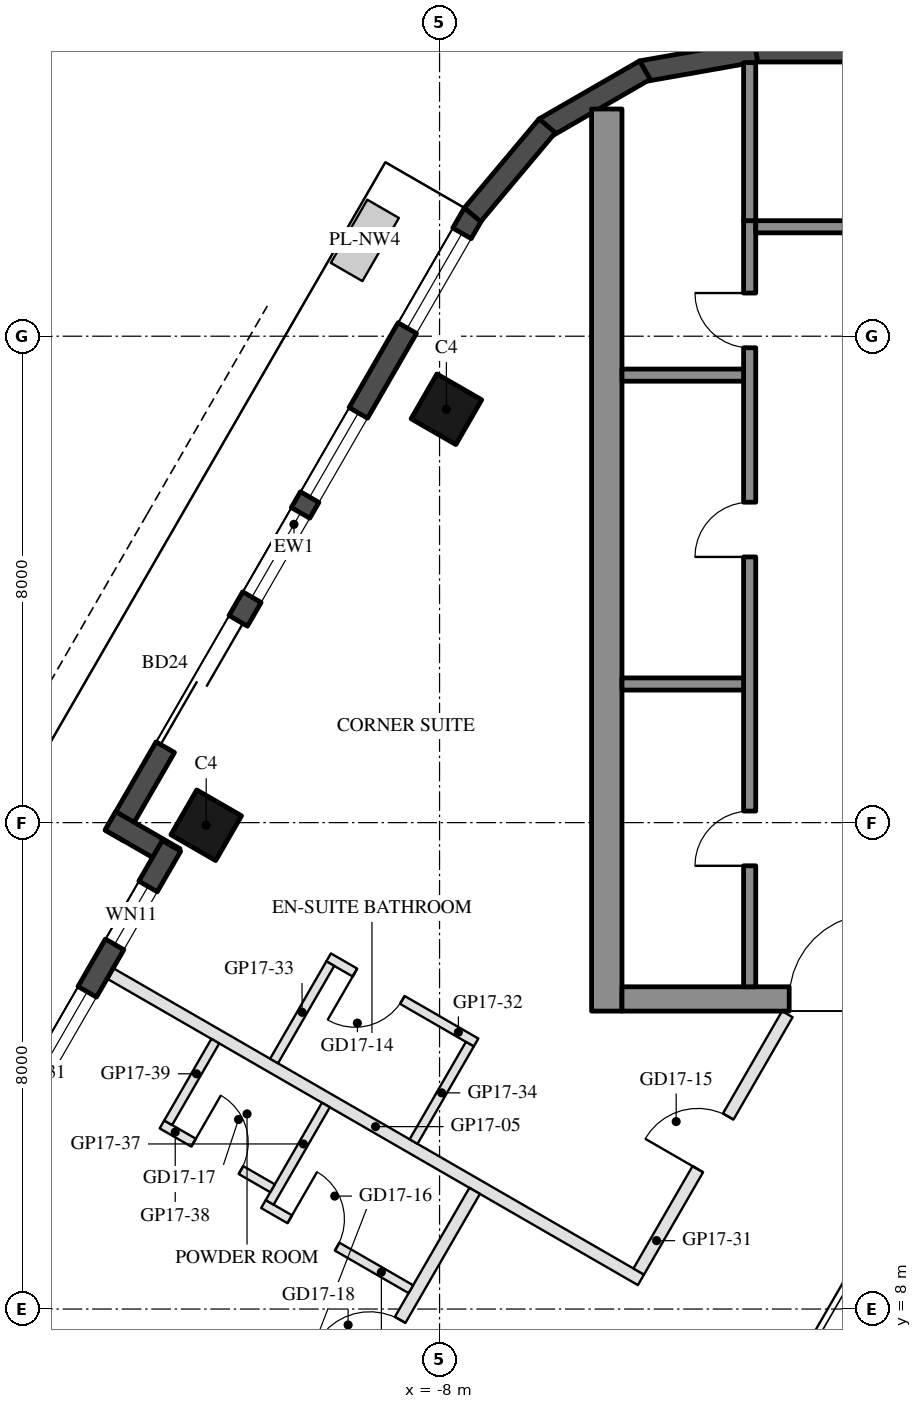
"""IFC4 building model, lengths in metres.
Left out: names, types, materials, properties, quantities, classifications, styles, units other than length and angle.
Written with IfcOpenShell. Run it as: python <this file> out.ifc"""

import sys

from ifc_helpers import new_model, si_unit, direction, frame, frame_2d, origin, origin_2d, place, context, subcontext, project, spatial, rectangle, hollow_rectangle, extrude, element, fill, save


model = new_model("IFC4")
c1 = context("Model", 3, precision=1e-05, world=origin(), true_north=direction((0.0, 1.0)))
c2 = subcontext(c1, "Body", "Model", "MODEL_VIEW")
j1 = project(units=[si_unit("LENGTHUNIT", "METRE"), si_unit("PLANEANGLEUNIT", "RADIAN")], contexts=[c1])
p1 = place(None, origin())
s1 = spatial("IfcSite", under=j1, at=p1, CompositionType="ELEMENT")
p2 = place(p1, origin())
s2 = spatial("IfcBuilding", under=s1, at=p2, CompositionType="ELEMENT")
p3 = place(p2, frame((0.0, 0.0, 183.6)))
s3 = spatial("IfcBuildingStorey", under=s2, at=p3, CompositionType="ELEMENT", Elevation=183.6)
for number, where, z_axis, x_axis in (
    (1, (-7.888, 22.798, 0.0), (0.0, 0.0, 1.0), (0.5, 0.866, 0.0)),
    (2, (-11.838, 15.957, 0.0), (0.0, 0.0, 1.0), (0.5, 0.866, 0.0)),
):
    element("IfcColumn", number, at=place(p3, frame(where, z_axis=z_axis, x_axis=x_axis)), inside=s3, PredefinedType="COLUMN", context=c2, shape_type="SweptSolid", body=[
        extrude(hollow_rectangle(XDim=0.85, YDim=0.85, WallThickness=0.04, at=origin_2d()), origin(), (0.0, 0.0, 1.0), 3.7),
    ])
p4 = place(p3, frame((-7.441, 26.022, 0.0), z_axis=(0.0, 0.0, 1.0), x_axis=(-0.499992533062, -0.86602971478, 0.0)))
e3 = element("IfcWall", 3, at=p4, inside=s3, PredefinedType="SOLIDWALL", context=c2, shape_type="SweptSolid", body=[
    extrude(rectangle(XDim=11.816, YDim=0.35, at=frame_2d((5.908, 0.0))), origin(), (0.0, 0.0, 1.0), 3.55),
])
p5 = place(p4, frame((0.381, 0.0, 0.3)))
e4 = element("IfcOpeningElement", 4, at=p5, cuts=e3, PredefinedType="OPENING", context=c2, shape_type="SweptSolid", body=[
    extrude(rectangle(XDim=1.8, YDim=2.65, at=frame_2d((0.9, 1.325))), frame((0.0, 0.185, 0.0), z_axis=(0.0, -1.0, 0.0), x_axis=(1.0, 0.0, 0.0)), (0.0, 0.0, 1.0), 0.37),
])
p6 = place(p4, frame((7.74, 0.0, 0.0)))
e5 = element("IfcOpeningElement", 5, at=p6, cuts=e3, PredefinedType="OPENING", context=c2, shape_type="SweptSolid", body=[
    extrude(rectangle(XDim=2.4, YDim=2.4, at=frame_2d((1.2, 1.2))), frame((0.0, 0.185, 0.0), z_axis=(0.0, -1.0, 0.0), x_axis=(1.0, 0.0, 0.0)), (0.0, 0.0, 1.0), 0.37),
])
p7 = place(p4, frame((3.791, 0.0, 0.3)))
e6 = element("IfcOpeningElement", 6, at=p7, cuts=e3, PredefinedType="OPENING", context=c2, shape_type="SweptSolid", body=[
    extrude(rectangle(XDim=1.6, YDim=2.65, at=frame_2d((0.8, 1.325))), frame((0.0, 0.185, 0.0), z_axis=(0.0, -1.0, 0.0), x_axis=(1.0, 0.0, 0.0)), (0.0, 0.0, 1.0), 0.37),
])
p8 = place(p4, frame((5.691, 0.0, 0.3)))
e7 = element("IfcOpeningElement", 7, at=p8, cuts=e3, PredefinedType="OPENING", context=c2, shape_type="SweptSolid", body=[
    extrude(rectangle(XDim=1.6, YDim=2.65, at=frame_2d((0.8, 1.325))), frame((0.0, 0.185, 0.0), z_axis=(0.0, -1.0, 0.0), x_axis=(1.0, 0.0, 0.0)), (0.0, 0.0, 1.0), 0.37),
])
p9 = place(p3, frame((-13.413, 16.029, 0.0), z_axis=(0.0, 0.0, 1.0), x_axis=(0.866005645448, -0.500034220881, 0.0)))
e8 = element("IfcWall", 8, at=p9, inside=s3, PredefinedType="SOLIDWALL", context=c2, shape_type="SweptSolid", body=[
    extrude(rectangle(XDim=1.22, YDim=0.35, at=frame_2d((0.61, 0.0))), origin(), (0.0, 0.0, 1.0), 3.55),
])
p10 = place(p3, frame((-12.409, 15.617, 0.0), z_axis=(0.0, 0.0, 1.0), x_axis=(-0.500003597184, -0.866023326939, 0.0)))
e9 = element("IfcWall", 9, at=p10, inside=s3, PredefinedType="SOLIDWALL", context=c2, shape_type="SweptSolid", body=[
    extrude(rectangle(XDim=6.74, YDim=0.35, at=frame_2d((3.37, 0.0))), origin(), (0.0, 0.0, 1.0), 3.55),
])
p11 = place(p10, frame((0.77, 0.0, 0.3)))
e10 = element("IfcOpeningElement", 10, at=p11, cuts=e9, PredefinedType="OPENING", context=c2, shape_type="SweptSolid", body=[
    extrude(rectangle(XDim=1.1, YDim=2.65, at=frame_2d((0.55, 1.325))), frame((0.0, 0.185, 0.0), z_axis=(0.0, -1.0, 0.0), x_axis=(1.0, 0.0, 0.0)), (0.0, 0.0, 1.0), 0.37),
])
p12 = place(p10, frame((2.77, 0.0, 0.3)))
e11 = element("IfcOpeningElement", 11, at=p12, cuts=e9, PredefinedType="OPENING", context=c2, shape_type="SweptSolid", body=[
    extrude(rectangle(XDim=3.1, YDim=2.65, at=frame_2d((1.55, 1.325))), frame((0.0, 0.185, 0.0), z_axis=(0.0, -1.0, 0.0), x_axis=(1.0, 0.0, 0.0)), (0.0, 0.0, 1.0), 0.37),
])
p13 = place(p3, frame((2.829, 28.685, 0.0), z_axis=(0.0, 0.0, 1.0), x_axis=(-1.0, 0.0, 0.0)))
e12 = element("IfcWall", 12, at=p13, inside=s3, PredefinedType="SOLIDWALL", context=c2, shape_type="SweptSolid", body=[
    extrude(rectangle(XDim=5.658, YDim=0.35, at=frame_2d((2.829, 0.0))), origin(), (0.0, 0.0, 1.0), 3.55),
])
for number, where, z_axis, x_axis in (
    (13, (-2.799, 28.688, 0.0), (0.0, 0.0, 1.0), (-0.985, -0.174, 0.0)),
    (14, (-4.623, 28.377, 0.0), (0.0, 0.0, 1.0), (-0.866, -0.5, 0.0)),
):
    element("IfcWall", number, at=place(p3, frame(where, z_axis=z_axis, x_axis=x_axis)), inside=s3, PredefinedType="SOLIDWALL", context=c2, shape_type="SweptSolid", body=[
        extrude(rectangle(XDim=1.91, YDim=0.35, at=frame_2d((0.955, 0.0))), origin(), (0.0, 0.0, 1.0), 3.55),
    ])
p14 = place(p3, frame((-6.23, 27.461, 0.0), z_axis=(0.0, 0.0, 1.0), x_axis=(-0.642808304945, -0.766027077259, 0.0)))
e15 = element("IfcWall", 15, at=p14, inside=s3, PredefinedType="SOLIDWALL", context=c2, shape_type="SweptSolid", body=[
    extrude(rectangle(XDim=1.91, YDim=0.35, at=frame_2d((0.955, 0.0))), origin(), (0.0, 0.0, 1.0), 3.55),
])
p15 = place(p3, frame((-5.25, 12.9, 0.0), z_axis=(0.0, 0.0, 1.0), x_axis=(0.0, 1.0, 0.0)))
e16 = element("IfcWall", 16, at=p15, inside=s3, PredefinedType="SHEAR", context=c2, shape_type="SweptSolid", body=[
    extrude(rectangle(XDim=14.837, YDim=0.5, at=frame_2d((7.418, 0.0))), origin(), (0.0, 0.0, 1.0), 3.5),
])
p16 = place(p3, frame((5.0, 13.1, 0.0), z_axis=(0.0, 0.0, 1.0), x_axis=(-1.0, 0.0, 0.0)))
e17 = element("IfcWall", 17, at=p16, inside=s3, PredefinedType="SHEAR", context=c2, shape_type="SweptSolid", body=[
    extrude(rectangle(XDim=10.0, YDim=0.4, at=frame_2d((5.0, 0.0))), origin(), (0.0, 0.0, 1.0), 3.5),
])
p17 = place(p16, frame((3.55, 0.0, 0.0)))
e18 = element("IfcOpeningElement", 18, at=p17, cuts=e17, PredefinedType="OPENING", context=c2, shape_type="SweptSolid", body=[
    extrude(rectangle(XDim=1.1, YDim=2.1, at=frame_2d((0.55, 1.05))), frame((0.0, 0.21, 0.0), z_axis=(0.0, -1.0, 0.0), x_axis=(1.0, 0.0, 0.0)), (0.0, 0.0, 1.0), 0.42),
])
p18 = place(p16, frame((5.85, 0.0, 0.0)))
e19 = element("IfcOpeningElement", 19, at=p18, cuts=e17, PredefinedType="OPENING", context=c2, shape_type="SweptSolid", body=[
    extrude(rectangle(XDim=1.4, YDim=2.1, at=frame_2d((0.7, 1.05))), frame((0.0, 0.21, 0.0), z_axis=(0.0, -1.0, 0.0), x_axis=(1.0, 0.0, 0.0)), (0.0, 0.0, 1.0), 0.42),
])
p19 = place(p3, frame((-2.9, 13.3, 0.0), z_axis=(0.0, 0.0, 1.0), x_axis=(0.0, 1.0, 0.0)))
e20 = element("IfcWall", 20, at=p19, inside=s3, PredefinedType="SHEAR", context=c2, shape_type="SweptSolid", body=[
    extrude(rectangle(XDim=12.6, YDim=0.2, at=frame_2d((6.3, 0.0))), origin(), (0.0, 0.0, 1.0), 3.5),
])
p20 = place(p19, frame((1.99, 0.0, 0.0)))
e21 = element("IfcOpeningElement", 21, at=p20, cuts=e20, PredefinedType="OPENING", context=c2, shape_type="SweptSolid", body=[
    extrude(rectangle(XDim=0.9, YDim=2.1, at=frame_2d((0.45, 1.05))), frame((0.0, 0.11, 0.0), z_axis=(0.0, -1.0, 0.0), x_axis=(1.0, 0.0, 0.0)), (0.0, 0.0, 1.0), 0.22),
])
p21 = place(p19, frame((7.07, 0.0, 0.0)))
e22 = element("IfcOpeningElement", 22, at=p21, cuts=e20, PredefinedType="OPENING", context=c2, shape_type="SweptSolid", body=[
    extrude(rectangle(XDim=0.9, YDim=2.1, at=frame_2d((0.45, 1.05))), frame((0.0, 0.11, 0.0), z_axis=(0.0, -1.0, 0.0), x_axis=(1.0, 0.0, 0.0)), (0.0, 0.0, 1.0), 0.22),
])
p22 = place(p19, frame((10.51, 0.0, 0.0)))
e23 = element("IfcOpeningElement", 23, at=p22, cuts=e20, PredefinedType="OPENING", context=c2, shape_type="SweptSolid", body=[
    extrude(rectangle(XDim=0.9, YDim=2.1, at=frame_2d((0.45, 1.05))), frame((0.0, 0.11, 0.0), z_axis=(0.0, -1.0, 0.0), x_axis=(1.0, 0.0, 0.0)), (0.0, 0.0, 1.0), 0.22),
])
p23 = place(p3, frame((-0.4, 25.8, 0.0), z_axis=(0.0, 0.0, 1.0), x_axis=(-1.0, 0.0, 0.0)))
e24 = element("IfcWall", 24, at=p23, inside=s3, PredefinedType="SHEAR", context=c2, shape_type="SweptSolid", body=[
    extrude(rectangle(XDim=2.4, YDim=0.2, at=frame_2d((1.2, 0.0))), origin(), (0.0, 0.0, 1.0), 3.5),
])
for number, where, z_axis, x_axis in (
    (25, (-3.0, 18.28, 0.0), (0.0, 0.0, 1.0), (-1.0, 0.0, 0.0)),
    (26, (-3.0, 23.36, 0.0), (0.0, 0.0, 1.0), (-1.0, 0.0, 0.0)),
):
    element("IfcWall", number, at=place(p3, frame(where, z_axis=z_axis, x_axis=x_axis)), inside=s3, PredefinedType="SHEAR", context=c2, shape_type="SweptSolid", body=[
        extrude(rectangle(XDim=2.0, YDim=0.2, at=frame_2d((1.0, 0.0))), origin(), (0.0, 0.0, 1.0), 3.5),
    ])
p24 = place(p3, frame((-2.9, 25.9, 0.0), z_axis=(0.0, 0.0, 1.0), x_axis=(0.0, 1.0, 0.0)))
e27 = element("IfcWall", 27, at=p24, inside=s3, PredefinedType="SHEAR", context=c2, shape_type="SweptSolid", body=[
    extrude(rectangle(XDim=2.6, YDim=0.2, at=frame_2d((1.3, 0.0))), origin(), (0.0, 0.0, 1.0), 3.5),
])
p25 = place(p3, frame((-13.417, 13.52, 0.0), z_axis=(0.0, 0.0, 1.0), x_axis=(0.866022637375, -0.500004791531, 0.0)))
e28 = element("IfcWall", 28, at=p25, inside=s3, PredefinedType="PARTITIONING", context=c2, shape_type="SweptSolid", body=[
    extrude(rectangle(XDim=10.08, YDim=0.2, at=frame_2d((5.04, 0.0))), origin(), (0.0, 0.0, 1.0), 3.06),
])
p26 = place(p3, frame((-4.725, 8.617, 0.0), z_axis=(0.0, 0.0, 1.0), x_axis=(0.499990498062, 0.866030889661, 0.0)))
e29 = element("IfcWall", 29, at=p26, inside=s3, PredefinedType="PARTITIONING", context=c2, shape_type="SweptSolid", body=[
    extrude(rectangle(XDim=4.888, YDim=0.2, at=frame_2d((2.444, 0.0))), origin(), (0.0, 0.0, 1.0), 2.95),
])
p27 = place(p26, frame((1.944, 0.0, 0.0)))
e30 = element("IfcOpeningElement", 30, at=p27, cuts=e29, PredefinedType="OPENING", context=c2, shape_type="SweptSolid", body=[
    extrude(rectangle(XDim=1.0, YDim=2.1, at=frame_2d((0.5, 1.05))), frame((0.0, 0.11, 0.0), z_axis=(0.0, -1.0, 0.0), x_axis=(1.0, 0.0, 0.0)), (0.0, 0.0, 1.0), 0.22),
])
p28 = place(p3, frame((-7.399, 12.384, 0.0), z_axis=(0.0, 0.0, 1.0), x_axis=(-0.866034573852, 0.49998411664, 0.0)))
e31 = element("IfcWall", 31, at=p28, inside=s3, PredefinedType="PARTITIONING", context=c2, shape_type="SweptSolid", body=[
    extrude(rectangle(XDim=2.8, YDim=0.15, at=frame_2d((1.4, 0.0))), origin(), (0.0, 0.0, 1.0), 3.55),
])
p29 = place(p28, frame((1.4, 0.0, 0.0)))
e32 = element("IfcOpeningElement", 32, at=p29, cuts=e31, PredefinedType="OPENING", context=c2, shape_type="SweptSolid", body=[
    extrude(rectangle(XDim=0.9, YDim=2.1, at=frame_2d((0.45, 1.05))), frame((0.0, 0.085, 0.0), z_axis=(0.0, -1.0, 0.0), x_axis=(1.0, 0.0, 0.0)), (0.0, 0.0, 1.0), 0.17),
])
for number, where, z_axis, x_axis in (
    (33, (-9.797, 13.681, 0.0), (0.0, 0.0, 1.0), (-0.5, -0.866, 0.0)),
    (34, (-7.502, 12.356, 0.0), (0.0, 0.0, 1.0), (-0.5, -0.866, 0.0)),
):
    element("IfcWall", number, at=place(p3, frame(where, z_axis=z_axis, x_axis=x_axis)), inside=s3, PredefinedType="PARTITIONING", context=c2, shape_type="SweptSolid", body=[
        extrude(rectangle(XDim=1.85, YDim=0.15, at=frame_2d((0.925, 0.0))), origin(), (0.0, 0.0, 1.0), 3.55),
    ])
p30 = place(p3, frame((-12.823, 0.591, 0.0), z_axis=(0.0, 0.0, 1.0), x_axis=(0.500012057535, 0.866018442252, 0.0)))
e35 = element("IfcWall", 35, at=p30, inside=s3, PredefinedType="PARTITIONING", context=c2, shape_type="SweptSolid", body=[
    extrude(rectangle(XDim=10.8, YDim=0.2, at=frame_2d((5.4, 0.0))), origin(), (0.0, 0.0, 1.0), 2.95),
])
p31 = place(p30, frame((7.35, 0.0, 0.0)))
e36 = element("IfcOpeningElement", 36, at=p31, cuts=e35, PredefinedType="OPENING", context=c2, shape_type="SweptSolid", body=[
    extrude(rectangle(XDim=1.0, YDim=2.1, at=frame_2d((0.5, 1.05))), frame((0.0, 0.11, 0.0), z_axis=(0.0, -1.0, 0.0), x_axis=(1.0, 0.0, 0.0)), (0.0, 0.0, 1.0), 0.22),
])
p32 = place(p3, frame((-10.897, 9.726, 0.0), z_axis=(0.0, 0.0, 1.0), x_axis=(0.866056369097, -0.49994636267, 0.0)))
e37 = element("IfcWall", 37, at=p32, inside=s3, PredefinedType="PARTITIONING", context=c2, shape_type="SweptSolid", body=[
    extrude(rectangle(XDim=2.8, YDim=0.15, at=frame_2d((1.4, 0.0))), origin(), (0.0, 0.0, 1.0), 3.55),
])
p33 = place(p32, frame((0.5, 0.0, 0.0)))
e38 = element("IfcOpeningElement", 38, at=p33, cuts=e37, PredefinedType="OPENING", context=c2, shape_type="SweptSolid", body=[
    extrude(rectangle(XDim=0.9, YDim=2.1, at=frame_2d((0.45, 1.05))), frame((0.0, 0.085, 0.0), z_axis=(0.0, -1.0, 0.0), x_axis=(1.0, 0.0, 0.0)), (0.0, 0.0, 1.0), 0.17),
])
p34 = place(p3, frame((-9.869, 11.356, 0.0), z_axis=(0.0, 0.0, 1.0), x_axis=(-0.500042316284, -0.866000971088, 0.0)))
e39 = element("IfcWall", 39, at=p34, inside=s3, PredefinedType="PARTITIONING", context=c2, shape_type="SweptSolid", body=[
    extrude(rectangle(XDim=1.85, YDim=0.15, at=frame_2d((0.925, 0.0))), origin(), (0.0, 0.0, 1.0), 2.95),
])
p35 = place(p3, frame((-12.565, 11.036, 0.0), z_axis=(0.0, 0.0, 1.0), x_axis=(0.866009402589, -0.500027713859, 0.0)))
e40 = element("IfcWall", 40, at=p35, inside=s3, PredefinedType="PARTITIONING", context=c2, shape_type="SweptSolid", body=[
    extrude(rectangle(XDim=2.1, YDim=0.15, at=frame_2d((1.05, 0.0))), origin(), (0.0, 0.0, 1.0), 3.55),
])
p36 = place(p35, frame((0.6, 0.0, 0.0)))
e41 = element("IfcOpeningElement", 41, at=p36, cuts=e40, PredefinedType="OPENING", context=c2, shape_type="SweptSolid", body=[
    extrude(rectangle(XDim=0.9, YDim=2.1, at=frame_2d((0.45, 1.05))), frame((0.0, 0.085, 0.0), z_axis=(0.0, -1.0, 0.0), x_axis=(1.0, 0.0, 0.0)), (0.0, 0.0, 1.0), 0.17),
])
p37 = place(p3, frame((-11.688, 12.406, 0.0), z_axis=(0.0, 0.0, 1.0), x_axis=(-0.499967891604, -0.866043940782, 0.0)))
e42 = element("IfcWall", 42, at=p37, inside=s3, PredefinedType="PARTITIONING", context=c2, shape_type="SweptSolid", body=[
    extrude(rectangle(XDim=1.55, YDim=0.15, at=frame_2d((0.775, 0.0))), origin(), (0.0, 0.0, 1.0), 2.95),
])
p38 = place(p5, origin())
e43 = element("IfcWindow", 43, at=p38, inside=s3, PartitioningType="SINGLE_PANEL", PredefinedType="WINDOW", context=c2, shape_type="SweptSolid", body=[
    extrude(rectangle(XDim=1.8, YDim=2.65, at=frame_2d((0.9, 1.325))), frame((0.0, 0.03, 0.0), z_axis=(0.0, -1.0, 0.0), x_axis=(1.0, 0.0, 0.0)), (0.0, 0.0, 1.0), 0.06),
])
fill(e4, e43)
p39 = place(p6, frame((2.4, 0.0, 0.0), z_axis=(0.0, 0.0, 1.0), x_axis=(-1.0, 0.0, 0.0)))
e44 = element("IfcDoor", 44, at=p39, inside=s3, OperationType="SLIDING_TO_LEFT", PredefinedType="DOOR", context=c2, shape_type="SweptSolid", body=[
    extrude(rectangle(XDim=2.4, YDim=2.4, at=frame_2d((1.2, 1.2))), frame((0.0, 0.025, 0.0), z_axis=(0.0, -1.0, 0.0), x_axis=(1.0, 0.0, 0.0)), (0.0, 0.0, 1.0), 0.05),
])
fill(e5, e44)
p40 = place(p7, origin())
e45 = element("IfcWindow", 45, at=p40, inside=s3, PartitioningType="SINGLE_PANEL", PredefinedType="WINDOW", context=c2, shape_type="SweptSolid", body=[
    extrude(rectangle(XDim=1.6, YDim=2.65, at=frame_2d((0.8, 1.325))), frame((0.0, 0.03, 0.0), z_axis=(0.0, -1.0, 0.0), x_axis=(1.0, 0.0, 0.0)), (0.0, 0.0, 1.0), 0.06),
])
fill(e6, e45)
p41 = place(p8, origin())
e46 = element("IfcWindow", 46, at=p41, inside=s3, PartitioningType="SINGLE_PANEL", PredefinedType="WINDOW", context=c2, shape_type="SweptSolid", body=[
    extrude(rectangle(XDim=1.6, YDim=2.65, at=frame_2d((0.8, 1.325))), frame((0.0, 0.03, 0.0), z_axis=(0.0, -1.0, 0.0), x_axis=(1.0, 0.0, 0.0)), (0.0, 0.0, 1.0), 0.06),
])
fill(e7, e46)
p42 = place(p11, origin())
e47 = element("IfcWindow", 47, at=p42, inside=s3, PartitioningType="SINGLE_PANEL", PredefinedType="WINDOW", context=c2, shape_type="SweptSolid", body=[
    extrude(rectangle(XDim=1.1, YDim=2.65, at=frame_2d((0.55, 1.325))), frame((0.0, 0.03, 0.0), z_axis=(0.0, -1.0, 0.0), x_axis=(1.0, 0.0, 0.0)), (0.0, 0.0, 1.0), 0.06),
])
fill(e10, e47)
p43 = place(p12, origin())
e48 = element("IfcWindow", 48, at=p43, inside=s3, PartitioningType="SINGLE_PANEL", PredefinedType="WINDOW", context=c2, shape_type="SweptSolid", body=[
    extrude(rectangle(XDim=3.1, YDim=2.65, at=frame_2d((1.55, 1.325))), frame((0.0, 0.03, 0.0), z_axis=(0.0, -1.0, 0.0), x_axis=(1.0, 0.0, 0.0)), (0.0, 0.0, 1.0), 0.06),
])
fill(e11, e48)
p44 = place(p20, origin())
e49 = element("IfcDoor", 49, at=p44, inside=s3, OperationType="SINGLE_SWING_LEFT", PredefinedType="DOOR", context=c2, shape_type="SweptSolid", body=[
    extrude(rectangle(XDim=0.9, YDim=2.1, at=frame_2d((0.45, 1.05))), frame((0.0, 0.025, 0.0), z_axis=(0.0, -1.0, 0.0), x_axis=(1.0, 0.0, 0.0)), (0.0, 0.0, 1.0), 0.05),
])
fill(e21, e49)
p45 = place(p21, origin())
e50 = element("IfcDoor", 50, at=p45, inside=s3, OperationType="SINGLE_SWING_LEFT", PredefinedType="DOOR", context=c2, shape_type="SweptSolid", body=[
    extrude(rectangle(XDim=0.9, YDim=2.1, at=frame_2d((0.45, 1.05))), frame((0.0, 0.025, 0.0), z_axis=(0.0, -1.0, 0.0), x_axis=(1.0, 0.0, 0.0)), (0.0, 0.0, 1.0), 0.05),
])
fill(e22, e50)
p46 = place(p22, origin())
e51 = element("IfcDoor", 51, at=p46, inside=s3, OperationType="SINGLE_SWING_RIGHT", PredefinedType="DOOR", context=c2, shape_type="SweptSolid", body=[
    extrude(rectangle(XDim=0.9, YDim=2.1, at=frame_2d((0.45, 1.05))), frame((0.0, 0.025, 0.0), z_axis=(0.0, -1.0, 0.0), x_axis=(1.0, 0.0, 0.0)), (0.0, 0.0, 1.0), 0.05),
])
fill(e23, e51)
p47 = place(p18, frame((1.4, 0.0, 0.0), z_axis=(0.0, 0.0, 1.0), x_axis=(-1.0, 0.0, 0.0)))
e52 = element("IfcDoor", 52, at=p47, inside=s3, OperationType="DOUBLE_DOOR_SINGLE_SWING", PredefinedType="DOOR", context=c2, shape_type="SweptSolid", body=[
    extrude(rectangle(XDim=1.4, YDim=2.1, at=frame_2d((0.7, 1.05))), frame((0.0, 0.025, 0.0), z_axis=(0.0, -1.0, 0.0), x_axis=(1.0, 0.0, 0.0)), (0.0, 0.0, 1.0), 0.05),
])
fill(e19, e52)
p48 = place(p29, origin())
e53 = element("IfcDoor", 53, at=p48, inside=s3, OperationType="SINGLE_SWING_RIGHT", PredefinedType="DOOR", context=c2, shape_type="SweptSolid", body=[
    extrude(rectangle(XDim=0.9, YDim=2.1, at=frame_2d((0.45, 1.05))), frame((0.0, 0.025, 0.0), z_axis=(0.0, -1.0, 0.0), x_axis=(1.0, 0.0, 0.0)), (0.0, 0.0, 1.0), 0.05),
])
fill(e32, e53)
p49 = place(p27, origin())
e54 = element("IfcDoor", 54, at=p49, inside=s3, OperationType="SINGLE_SWING_LEFT", PredefinedType="DOOR", context=c2, shape_type="SweptSolid", body=[
    extrude(rectangle(XDim=1.0, YDim=2.1, at=frame_2d((0.5, 1.05))), frame((0.0, 0.025, 0.0), z_axis=(0.0, -1.0, 0.0), x_axis=(1.0, 0.0, 0.0)), (0.0, 0.0, 1.0), 0.05),
])
fill(e30, e54)
p50 = place(p33, origin())
e55 = element("IfcDoor", 55, at=p50, inside=s3, OperationType="SINGLE_SWING_LEFT", PredefinedType="DOOR", context=c2, shape_type="SweptSolid", body=[
    extrude(rectangle(XDim=0.9, YDim=2.1, at=frame_2d((0.45, 1.05))), frame((0.0, 0.025, 0.0), z_axis=(0.0, -1.0, 0.0), x_axis=(1.0, 0.0, 0.0)), (0.0, 0.0, 1.0), 0.05),
])
fill(e38, e55)
p51 = place(p36, origin())
e56 = element("IfcDoor", 56, at=p51, inside=s3, OperationType="SINGLE_SWING_LEFT", PredefinedType="DOOR", context=c2, shape_type="SweptSolid", body=[
    extrude(rectangle(XDim=0.9, YDim=2.1, at=frame_2d((0.45, 1.05))), frame((0.0, 0.025, 0.0), z_axis=(0.0, -1.0, 0.0), x_axis=(1.0, 0.0, 0.0)), (0.0, 0.0, 1.0), 0.05),
])
fill(e41, e56)
p52 = place(p31, origin())
e57 = element("IfcDoor", 57, at=p52, inside=s3, OperationType="SINGLE_SWING_LEFT", PredefinedType="DOOR", context=c2, shape_type="SweptSolid", body=[
    extrude(rectangle(XDim=1.0, YDim=2.1, at=frame_2d((0.5, 1.05))), frame((0.0, 0.025, 0.0), z_axis=(0.0, -1.0, 0.0), x_axis=(1.0, 0.0, 0.0)), (0.0, 0.0, 1.0), 0.05),
])
fill(e36, e57)
save(model, sys.argv[1])
